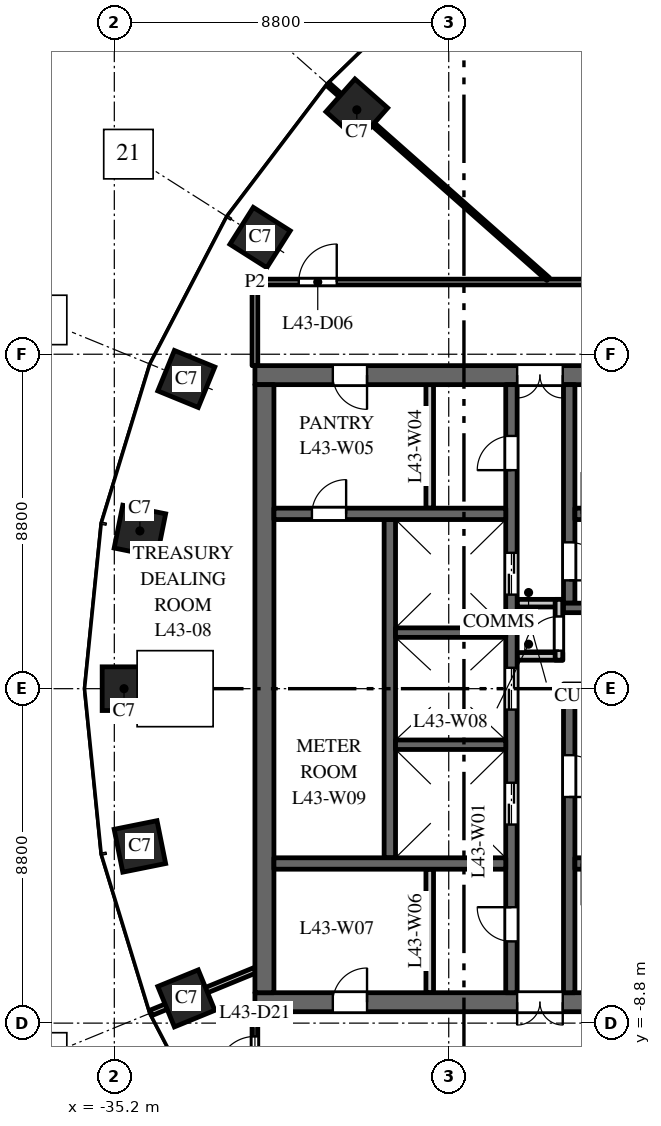
"""IFC4 building model, lengths in metres.
Left out: names, types, materials, properties, quantities, classifications, styles, units other than length and angle.
Written with IfcOpenShell. Run it as: python <this file> out.ifc"""

import sys

from ifc_helpers import new_model, si_unit, direction, frame, frame_2d, origin, origin_2d, place, context, subcontext, project, spatial, rectangle, extrude, element, fill, save


model = new_model("IFC4")
c1 = context("Model", 3, precision=1e-05, world=origin(), true_north=direction((0.0, 1.0)))
c2 = subcontext(c1, "Body", "Model", "MODEL_VIEW")
j1 = project(units=[si_unit("LENGTHUNIT", "METRE"), si_unit("PLANEANGLEUNIT", "RADIAN")], contexts=[c1])
p1 = place(None, origin())
s1 = spatial("IfcSite", under=j1, at=p1, CompositionType="ELEMENT")
p2 = place(p1, origin())
s2 = spatial("IfcBuilding", under=s1, at=p2, CompositionType="ELEMENT")
p3 = place(p2, frame((0.0, 0.0, 186.0)))
s3 = spatial("IfcBuildingStorey", under=s2, at=p3, CompositionType="ELEMENT", Elevation=186.0)
for number, where, z_axis, x_axis in (
    (1, (-28.819, 15.23, 0.0), (0.0, 0.0, 1.0), (-0.663, -0.749, 0.0)),
    (2, (-31.365, 11.871, 0.0), (0.0, 0.0, 1.0), (-0.535, -0.845, 0.0)),
    (3, (-33.305, 8.149, 0.0), (0.0, 0.0, 1.0), (-0.379, -0.925, 0.0)),
    (4, (-34.527, 4.151, 0.0), (0.0, 0.0, 1.0), (-0.197, -0.98, 0.0)),
    (5, (-34.945, 0.0, 0.0), (0.0, 0.0, 1.0), (0.0, -1.0, 0.0)),
    (6, (-34.527, -4.151, 0.0), (0.0, 0.0, 1.0), (0.197, -0.98, 0.0)),
    (7, (-33.305, -8.149, 0.0), (0.0, 0.0, 1.0), (0.379, -0.925, 0.0)),
):
    element("IfcColumn", number, at=place(p3, frame(where, z_axis=z_axis, x_axis=x_axis)), inside=s3, PredefinedType="COLUMN", context=c2, shape_type="SweptSolid", body=[
        extrude(rectangle(XDim=1.15, YDim=1.15, at=origin_2d()), origin(), (0.0, 0.0, 1.0), 4.0),
    ])
p4 = place(p3, frame((-16.5, 8.25, 0.0), z_axis=(0.0, 0.0, 1.0), x_axis=(-1.0, 0.0, 0.0)))
e8 = element("IfcWall", 8, at=p4, inside=s3, PredefinedType="SHEAR", context=c2, shape_type="SweptSolid", body=[
    extrude(rectangle(XDim=15.0, YDim=0.5, at=frame_2d((7.5, 0.0))), origin(), (0.0, 0.0, 1.0), 3.7),
])
p5 = place(p4, frame((6.9, 0.0, 0.0)))
e9 = element("IfcOpeningElement", 9, at=p5, cuts=e8, PredefinedType="OPENING", context=c2, shape_type="SweptSolid", body=[
    extrude(rectangle(XDim=1.2, YDim=2.1, at=frame_2d((0.6, 1.05))), frame((0.0, 0.26, 0.0), z_axis=(0.0, -1.0, 0.0), x_axis=(1.0, 0.0, 0.0)), (0.0, 0.0, 1.0), 0.52),
])
p6 = place(p4, frame((12.05, 0.0, 0.0)))
e10 = element("IfcOpeningElement", 10, at=p6, cuts=e8, PredefinedType="OPENING", context=c2, shape_type="SweptSolid", body=[
    extrude(rectangle(XDim=0.9, YDim=2.1, at=frame_2d((0.45, 1.05))), frame((0.0, 0.26, 0.0), z_axis=(0.0, -1.0, 0.0), x_axis=(1.0, 0.0, 0.0)), (0.0, 0.0, 1.0), 0.52),
])
p7 = place(p3, frame((-16.5, -8.25, 0.0), z_axis=(0.0, 0.0, 1.0), x_axis=(-1.0, 0.0, 0.0)))
e11 = element("IfcWall", 11, at=p7, inside=s3, PredefinedType="SHEAR", context=c2, shape_type="SweptSolid", body=[
    extrude(rectangle(XDim=15.0, YDim=0.5, at=frame_2d((7.5, 0.0))), origin(), (0.0, 0.0, 1.0), 3.7),
])
p8 = place(p7, frame((6.9, 0.0, 0.0)))
e12 = element("IfcOpeningElement", 12, at=p8, cuts=e11, PredefinedType="OPENING", context=c2, shape_type="SweptSolid", body=[
    extrude(rectangle(XDim=1.2, YDim=2.1, at=frame_2d((0.6, 1.05))), frame((0.0, 0.26, 0.0), z_axis=(0.0, -1.0, 0.0), x_axis=(1.0, 0.0, 0.0)), (0.0, 0.0, 1.0), 0.52),
])
p9 = place(p7, frame((12.05, 0.0, 0.0)))
e13 = element("IfcOpeningElement", 13, at=p9, cuts=e11, PredefinedType="OPENING", context=c2, shape_type="SweptSolid", body=[
    extrude(rectangle(XDim=0.9, YDim=2.1, at=frame_2d((0.45, 1.05))), frame((0.0, 0.26, 0.0), z_axis=(0.0, -1.0, 0.0), x_axis=(1.0, 0.0, 0.0)), (0.0, 0.0, 1.0), 0.52),
])
p10 = place(p3, frame((-27.95, -4.45, 0.0), z_axis=(0.0, 0.0, 1.0), x_axis=(0.0, 1.0, 0.0)))
e14 = element("IfcWall", 14, at=p10, inside=s3, PredefinedType="SHEAR", context=c2, shape_type="SweptSolid", body=[
    extrude(rectangle(XDim=8.9, YDim=0.3, at=frame_2d((4.45, 0.0))), origin(), (0.0, 0.0, 1.0), 3.7),
])
p11 = place(p3, frame((-24.75, -8.0, 0.0), z_axis=(0.0, 0.0, 1.0), x_axis=(0.0, 1.0, 0.0)))
e15 = element("IfcWall", 15, at=p11, inside=s3, PredefinedType="SHEAR", context=c2, shape_type="SweptSolid", body=[
    extrude(rectangle(XDim=16.0, YDim=0.3, at=frame_2d((8.0, 0.0))), origin(), (0.0, 0.0, 1.0), 3.7),
])
p12 = place(p11, frame((4.425, 0.0, 0.0)))
e16 = element("IfcOpeningElement", 16, at=p12, cuts=e15, PredefinedType="OPENING", context=c2, shape_type="SweptSolid", body=[
    extrude(rectangle(XDim=1.1, YDim=2.1, at=frame_2d((0.55, 1.05))), frame((0.0, 0.16, 0.0), z_axis=(0.0, -1.0, 0.0), x_axis=(1.0, 0.0, 0.0)), (0.0, 0.0, 1.0), 0.32),
])
p13 = place(p11, frame((7.45, 0.0, 0.0)))
e17 = element("IfcOpeningElement", 17, at=p13, cuts=e15, PredefinedType="OPENING", context=c2, shape_type="SweptSolid", body=[
    extrude(rectangle(XDim=1.1, YDim=2.1, at=frame_2d((0.55, 1.05))), frame((0.0, 0.16, 0.0), z_axis=(0.0, -1.0, 0.0), x_axis=(1.0, 0.0, 0.0)), (0.0, 0.0, 1.0), 0.32),
])
p14 = place(p11, frame((10.475, 0.0, 0.0)))
e18 = element("IfcOpeningElement", 18, at=p14, cuts=e15, PredefinedType="OPENING", context=c2, shape_type="SweptSolid", body=[
    extrude(rectangle(XDim=1.1, YDim=2.1, at=frame_2d((0.55, 1.05))), frame((0.0, 0.16, 0.0), z_axis=(0.0, -1.0, 0.0), x_axis=(1.0, 0.0, 0.0)), (0.0, 0.0, 1.0), 0.32),
])
p15 = place(p11, frame((13.75, 0.0, 0.0)))
e19 = element("IfcOpeningElement", 19, at=p15, cuts=e15, PredefinedType="OPENING", context=c2, shape_type="SweptSolid", body=[
    extrude(rectangle(XDim=0.9, YDim=2.1, at=frame_2d((0.45, 1.05))), frame((0.0, 0.16, 0.0), z_axis=(0.0, -1.0, 0.0), x_axis=(1.0, 0.0, 0.0)), (0.0, 0.0, 1.0), 0.32),
])
p16 = place(p11, frame((1.35, 0.0, 0.0)))
e20 = element("IfcOpeningElement", 20, at=p16, cuts=e15, PredefinedType="OPENING", context=c2, shape_type="SweptSolid", body=[
    extrude(rectangle(XDim=0.9, YDim=2.1, at=frame_2d((0.45, 1.05))), frame((0.0, 0.16, 0.0), z_axis=(0.0, -1.0, 0.0), x_axis=(1.0, 0.0, 0.0)), (0.0, 0.0, 1.0), 0.32),
])
p17 = place(p3, frame((-20.1, 0.0, 0.0), z_axis=(0.0, 0.0, 1.0), x_axis=(-1.0, 0.0, 0.0)))
e21 = element("IfcWall", 21, at=p17, inside=s3, PredefinedType="SHEAR", context=c2, shape_type="SweptSolid", body=[
    extrude(rectangle(XDim=3.28, YDim=0.25, at=frame_2d((1.64, 0.0))), origin(), (0.0, 0.0, 1.0), 3.7),
])
for number, where, z_axis, x_axis in (
    (22, (-23.4, 0.85, 0.0), (0.0, 0.0, 1.0), (-1.0, 0.0, 0.0)),
    (23, (-23.4, 2.25, 0.0), (0.0, 0.0, 1.0), (-1.0, 0.0, 0.0)),
):
    element("IfcWall", number, at=place(p3, frame(where, z_axis=z_axis, x_axis=x_axis)), inside=s3, PredefinedType="PARTITIONING", context=c2, shape_type="SweptSolid", body=[
        extrude(rectangle(XDim=1.2, YDim=0.2, at=frame_2d((0.6, 0.0))), origin(), (0.0, 0.0, 1.0), 3.7),
    ])
p18 = place(p3, frame((-23.5, 0.75, 0.0), z_axis=(0.0, 0.0, 1.0), x_axis=(0.0, 1.0, 0.0)))
e24 = element("IfcWall", 24, at=p18, inside=s3, PredefinedType="PARTITIONING", context=c2, shape_type="SweptSolid", body=[
    extrude(rectangle(XDim=1.6, YDim=0.2, at=frame_2d((0.8, 0.0))), origin(), (0.0, 0.0, 1.0), 3.7),
])
p19 = place(p18, frame((0.25, 0.0, 0.0)))
e25 = element("IfcOpeningElement", 25, at=p19, cuts=e24, PredefinedType="OPENING", context=c2, shape_type="SweptSolid", body=[
    extrude(rectangle(XDim=0.9, YDim=2.1, at=frame_2d((0.45, 1.05))), frame((0.0, 0.11, 0.0), z_axis=(0.0, -1.0, 0.0), x_axis=(1.0, 0.0, 0.0)), (0.0, 0.0, 1.0), 0.22),
])
p20 = place(p3, frame((-31.25, -8.0, 0.0), z_axis=(0.0, 0.0, 1.0), x_axis=(0.0, 1.0, 0.0)))
e26 = element("IfcWall", 26, at=p20, inside=s3, PredefinedType="SHEAR", context=c2, shape_type="SweptSolid", body=[
    extrude(rectangle(XDim=16.0, YDim=0.5, at=frame_2d((8.0, 0.0))), origin(), (0.0, 0.0, 1.0), 3.7),
])
p21 = place(p3, frame((-24.9, 4.6, 0.0), z_axis=(0.0, 0.0, 1.0), x_axis=(-1.0, 0.0, 0.0)))
e27 = element("IfcWall", 27, at=p21, inside=s3, PredefinedType="SHEAR", context=c2, shape_type="SweptSolid", body=[
    extrude(rectangle(XDim=6.1, YDim=0.3, at=frame_2d((3.05, 0.0))), origin(), (0.0, 0.0, 1.0), 3.7),
])
p22 = place(p21, frame((4.2, 0.0, 0.0)))
e28 = element("IfcOpeningElement", 28, at=p22, cuts=e27, PredefinedType="OPENING", context=c2, shape_type="SweptSolid", body=[
    extrude(rectangle(XDim=0.9, YDim=2.1, at=frame_2d((0.45, 1.05))), frame((0.0, 0.16, 0.0), z_axis=(0.0, -1.0, 0.0), x_axis=(1.0, 0.0, 0.0)), (0.0, 0.0, 1.0), 0.32),
])
for number, where, z_axis, x_axis in (
    (29, (-26.9, 4.75, 0.0), (0.0, 0.0, 1.0), (0.0, 1.0, 0.0)),
    (30, (-26.9, -8.0, 0.0), (0.0, 0.0, 1.0), (0.0, 1.0, 0.0)),
):
    element("IfcWall", number, at=place(p3, frame(where, z_axis=z_axis, x_axis=x_axis)), inside=s3, PredefinedType="PARTITIONING", context=c2, shape_type="SweptSolid", body=[
        extrude(rectangle(XDim=3.25, YDim=0.2, at=frame_2d((1.625, 0.0))), origin(), (0.0, 0.0, 1.0), 3.7),
    ])
p23 = place(p3, frame((-24.9, -4.6, 0.0), z_axis=(0.0, 0.0, 1.0), x_axis=(-1.0, 0.0, 0.0)))
e31 = element("IfcWall", 31, at=p23, inside=s3, PredefinedType="SHEAR", context=c2, shape_type="SweptSolid", body=[
    extrude(rectangle(XDim=6.1, YDim=0.3, at=frame_2d((3.05, 0.0))), origin(), (0.0, 0.0, 1.0), 3.7),
])
for number, where, z_axis, x_axis in (
    (32, (-24.9, -1.475, 0.0), (0.0, 0.0, 1.0), (-1.0, 0.0, 0.0)),
    (33, (-24.9, 1.475, 0.0), (0.0, 0.0, 1.0), (-1.0, 0.0, 0.0)),
):
    element("IfcWall", number, at=place(p3, frame(where, z_axis=z_axis, x_axis=x_axis)), inside=s3, PredefinedType="SHEAR", context=c2, shape_type="SweptSolid", body=[
        extrude(rectangle(XDim=2.9, YDim=0.25, at=frame_2d((1.45, 0.0))), origin(), (0.0, 0.0, 1.0), 3.7),
    ])
p24 = place(p3, frame((-23.23, 2.25, 0.0), z_axis=(0.0, 0.0, 1.0), x_axis=(0.0, 1.0, 0.0)))
e34 = element("IfcWall", 34, at=p24, inside=s3, PredefinedType="SHEAR", context=c2, shape_type="SweptSolid", body=[
    extrude(rectangle(XDim=5.75, YDim=0.3, at=frame_2d((2.875, 0.0))), origin(), (0.0, 0.0, 1.0), 3.7),
])
p25 = place(p24, frame((0.6, 0.0, 0.0)))
e35 = element("IfcOpeningElement", 35, at=p25, cuts=e34, PredefinedType="OPENING", context=c2, shape_type="SweptSolid", body=[
    extrude(rectangle(XDim=1.0, YDim=2.1, at=frame_2d((0.5, 1.05))), frame((0.0, 0.16, 0.0), z_axis=(0.0, -1.0, 0.0), x_axis=(1.0, 0.0, 0.0)), (0.0, 0.0, 1.0), 0.32),
])
p26 = place(p3, frame((-23.23, -8.0, 0.0), z_axis=(0.0, 0.0, 1.0), x_axis=(0.0, 1.0, 0.0)))
e36 = element("IfcWall", 36, at=p26, inside=s3, PredefinedType="SHEAR", context=c2, shape_type="SweptSolid", body=[
    extrude(rectangle(XDim=7.875, YDim=0.3, at=frame_2d((3.938, 0.0))), origin(), (0.0, 0.0, 1.0), 3.7),
])
p27 = place(p26, frame((5.15, 0.0, 0.0)))
e37 = element("IfcOpeningElement", 37, at=p27, cuts=e36, PredefinedType="OPENING", context=c2, shape_type="SweptSolid", body=[
    extrude(rectangle(XDim=1.1, YDim=2.1, at=frame_2d((0.55, 1.05))), frame((0.0, 0.16, 0.0), z_axis=(0.0, -1.0, 0.0), x_axis=(1.0, 0.0, 0.0)), (0.0, 0.0, 1.0), 0.32),
])
p28 = place(p3, frame((-16.9, 4.6, 0.0), z_axis=(0.0, 0.0, 1.0), x_axis=(-1.0, 0.0, 0.0)))
e38 = element("IfcWall", 38, at=p28, inside=s3, PredefinedType="SHEAR", context=c2, shape_type="SweptSolid", body=[
    extrude(rectangle(XDim=6.18, YDim=0.3, at=frame_2d((3.09, 0.0))), origin(), (0.0, 0.0, 1.0), 3.7),
])
p29 = place(p28, frame((4.9, 0.0, 0.0)))
e39 = element("IfcOpeningElement", 39, at=p29, cuts=e38, PredefinedType="OPENING", context=c2, shape_type="SweptSolid", body=[
    extrude(rectangle(XDim=1.1, YDim=2.1, at=frame_2d((0.55, 1.05))), frame((0.0, 0.16, 0.0), z_axis=(0.0, -1.0, 0.0), x_axis=(1.0, 0.0, 0.0)), (0.0, 0.0, 1.0), 0.32),
])
p30 = place(p3, frame((-16.9, -4.6, 0.0), z_axis=(0.0, 0.0, 1.0), x_axis=(-1.0, 0.0, 0.0)))
e40 = element("IfcWall", 40, at=p30, inside=s3, PredefinedType="SHEAR", context=c2, shape_type="SweptSolid", body=[
    extrude(rectangle(XDim=6.18, YDim=0.3, at=frame_2d((3.09, 0.0))), origin(), (0.0, 0.0, 1.0), 3.7),
])
p31 = place(p30, frame((4.9, 0.0, 0.0)))
e41 = element("IfcOpeningElement", 41, at=p31, cuts=e40, PredefinedType="OPENING", context=c2, shape_type="SweptSolid", body=[
    extrude(rectangle(XDim=1.1, YDim=2.1, at=frame_2d((0.55, 1.05))), frame((0.0, 0.16, 0.0), z_axis=(0.0, -1.0, 0.0), x_axis=(1.0, 0.0, 0.0)), (0.0, 0.0, 1.0), 0.32),
])
p32 = place(p3, frame((-20.85, 2.125, 0.0), z_axis=(0.0, 0.0, 1.0), x_axis=(-1.0, 0.0, 0.0)))
e42 = element("IfcWall", 42, at=p32, inside=s3, PredefinedType="SHEAR", context=c2, shape_type="SweptSolid", body=[
    extrude(rectangle(XDim=2.53, YDim=0.25, at=frame_2d((1.265, 0.0))), origin(), (0.0, 0.0, 1.0), 3.7),
])
p33 = place(p3, frame((-34.234, -8.53, 0.0), z_axis=(0.0, 0.0, 1.0), x_axis=(0.925344112436, 0.379128307542, 0.0)))
e43 = element("IfcWall", 43, at=p33, inside=s3, PredefinedType="PARTITIONING", context=c2, shape_type="SweptSolid", body=[
    extrude(rectangle(XDim=2.954, YDim=0.15, at=frame_2d((1.477, 0.0))), origin(), (0.0, 0.0, 1.0), 2.9),
])
p34 = place(p3, frame((-31.5, -10.7, 0.0), z_axis=(0.0, 0.0, 1.0), x_axis=(0.0, 1.0, 0.0)))
e44 = element("IfcWall", 44, at=p34, inside=s3, PredefinedType="PARTITIONING", context=c2, shape_type="SweptSolid", body=[
    extrude(rectangle(XDim=2.2, YDim=0.15, at=frame_2d((1.1, 0.0))), origin(), (0.0, 0.0, 1.0), 3.7),
])
p35 = place(p34, frame((0.55, 0.0, 0.0)))
e45 = element("IfcOpeningElement", 45, at=p35, cuts=e44, PredefinedType="OPENING", context=c2, shape_type="SweptSolid", body=[
    extrude(rectangle(XDim=1.0, YDim=2.1, at=frame_2d((0.5, 1.05))), frame((0.0, 0.085, 0.0), z_axis=(0.0, -1.0, 0.0), x_axis=(1.0, 0.0, 0.0)), (0.0, 0.0, 1.0), 0.17),
])
p36 = place(p3, frame((-31.5, 8.5, 0.0), z_axis=(0.0, 0.0, 1.0), x_axis=(0.0, 1.0, 0.0)))
e46 = element("IfcWall", 46, at=p36, inside=s3, PredefinedType="PARTITIONING", context=c2, shape_type="SweptSolid", body=[
    extrude(rectangle(XDim=2.2, YDim=0.15, at=frame_2d((1.1, 0.0))), origin(), (0.0, 0.0, 1.0), 3.7),
])
p37 = place(p3, frame((-31.5, 10.7, 0.0), z_axis=(0.0, 0.0, 1.0), x_axis=(1.0, 0.0, 0.0)))
e47 = element("IfcWall", 47, at=p37, inside=s3, PredefinedType="PARTITIONING", context=c2, shape_type="SweptSolid", body=[
    extrude(rectangle(XDim=15.0, YDim=0.15, at=frame_2d((7.5, 0.0))), origin(), (0.0, 0.0, 1.0), 3.1),
])
p38 = place(p37, frame((1.153, 0.0, 0.0)))
e48 = element("IfcOpeningElement", 48, at=p38, cuts=e47, PredefinedType="OPENING", context=c2, shape_type="SweptSolid", body=[
    extrude(rectangle(XDim=1.0, YDim=2.1, at=frame_2d((0.5, 1.05))), frame((0.0, 0.085, 0.0), z_axis=(0.0, -1.0, 0.0), x_axis=(1.0, 0.0, 0.0)), (0.0, 0.0, 1.0), 0.17),
])
p39 = place(p37, frame((13.35, 0.0, 0.0)))
e49 = element("IfcOpeningElement", 49, at=p39, cuts=e47, PredefinedType="OPENING", context=c2, shape_type="SweptSolid", body=[
    extrude(rectangle(XDim=1.0, YDim=2.1, at=frame_2d((0.5, 1.05))), frame((0.0, 0.085, 0.0), z_axis=(0.0, -1.0, 0.0), x_axis=(1.0, 0.0, 0.0)), (0.0, 0.0, 1.0), 0.17),
])
p40 = place(p3, frame((-29.569, 15.895, 0.0), z_axis=(0.0, 0.0, 1.0), x_axis=(0.748985701008, -0.662586160198, 0.0)))
e50 = element("IfcWall", 50, at=p40, inside=s3, PredefinedType="PARTITIONING", context=c2, shape_type="SweptSolid", body=[
    extrude(rectangle(XDim=7.723, YDim=0.1, at=frame_2d((3.861, 0.0))), origin(), (0.0, 0.0, 1.0), 2.9),
])
p41 = place(p12, origin())
e51 = element("IfcDoor", 51, at=p41, inside=s3, OperationType="DOUBLE_DOOR_SLIDING", PredefinedType="DOOR", context=c2, shape_type="SweptSolid", body=[
    extrude(rectangle(XDim=1.1, YDim=2.1, at=frame_2d((0.55, 1.05))), frame((0.0, 0.025, 0.0), z_axis=(0.0, -1.0, 0.0), x_axis=(1.0, 0.0, 0.0)), (0.0, 0.0, 1.0), 0.05),
])
fill(e16, e51)
p42 = place(p13, origin())
e52 = element("IfcDoor", 52, at=p42, inside=s3, OperationType="DOUBLE_DOOR_SLIDING", PredefinedType="DOOR", context=c2, shape_type="SweptSolid", body=[
    extrude(rectangle(XDim=1.1, YDim=2.1, at=frame_2d((0.55, 1.05))), frame((0.0, 0.025, 0.0), z_axis=(0.0, -1.0, 0.0), x_axis=(1.0, 0.0, 0.0)), (0.0, 0.0, 1.0), 0.05),
])
fill(e17, e52)
p43 = place(p14, origin())
e53 = element("IfcDoor", 53, at=p43, inside=s3, OperationType="DOUBLE_DOOR_SLIDING", PredefinedType="DOOR", context=c2, shape_type="SweptSolid", body=[
    extrude(rectangle(XDim=1.1, YDim=2.1, at=frame_2d((0.55, 1.05))), frame((0.0, 0.025, 0.0), z_axis=(0.0, -1.0, 0.0), x_axis=(1.0, 0.0, 0.0)), (0.0, 0.0, 1.0), 0.05),
])
fill(e18, e53)
p44 = place(p29, origin())
e54 = element("IfcDoor", 54, at=p44, inside=s3, OperationType="SINGLE_SWING_RIGHT", PredefinedType="DOOR", context=c2, shape_type="SweptSolid", body=[
    extrude(rectangle(XDim=1.1, YDim=2.1, at=frame_2d((0.55, 1.05))), frame((0.0, 0.025, 0.0), z_axis=(0.0, -1.0, 0.0), x_axis=(1.0, 0.0, 0.0)), (0.0, 0.0, 1.0), 0.05),
])
fill(e39, e54)
p45 = place(p31, origin())
e55 = element("IfcDoor", 55, at=p45, inside=s3, OperationType="SINGLE_SWING_LEFT", PredefinedType="DOOR", context=c2, shape_type="SweptSolid", body=[
    extrude(rectangle(XDim=1.1, YDim=2.1, at=frame_2d((0.55, 1.05))), frame((0.0, 0.025, 0.0), z_axis=(0.0, -1.0, 0.0), x_axis=(1.0, 0.0, 0.0)), (0.0, 0.0, 1.0), 0.05),
])
fill(e41, e55)
p46 = place(p27, origin())
e56 = element("IfcDoor", 56, at=p46, inside=s3, OperationType="SINGLE_SWING_LEFT", PredefinedType="DOOR", context=c2, shape_type="SweptSolid", body=[
    extrude(rectangle(XDim=1.1, YDim=2.1, at=frame_2d((0.55, 1.05))), frame((0.0, 0.025, 0.0), z_axis=(0.0, -1.0, 0.0), x_axis=(1.0, 0.0, 0.0)), (0.0, 0.0, 1.0), 0.05),
])
fill(e37, e56)
p47 = place(p25, origin())
e57 = element("IfcDoor", 57, at=p47, inside=s3, OperationType="SINGLE_SWING_LEFT", PredefinedType="DOOR", context=c2, shape_type="SweptSolid", body=[
    extrude(rectangle(XDim=1.0, YDim=2.1, at=frame_2d((0.5, 1.05))), frame((0.0, 0.025, 0.0), z_axis=(0.0, -1.0, 0.0), x_axis=(1.0, 0.0, 0.0)), (0.0, 0.0, 1.0), 0.05),
])
fill(e35, e57)
p48 = place(p5, origin())
e58 = element("IfcDoor", 58, at=p48, inside=s3, OperationType="DOUBLE_DOOR_DOUBLE_SWING", PredefinedType="DOOR", context=c2, shape_type="SweptSolid", body=[
    extrude(rectangle(XDim=1.2, YDim=2.1, at=frame_2d((0.6, 1.05))), frame((0.0, 0.025, 0.0), z_axis=(0.0, -1.0, 0.0), x_axis=(1.0, 0.0, 0.0)), (0.0, 0.0, 1.0), 0.05),
])
fill(e9, e58)
p49 = place(p8, origin())
e59 = element("IfcDoor", 59, at=p49, inside=s3, OperationType="DOUBLE_DOOR_DOUBLE_SWING", PredefinedType="DOOR", context=c2, shape_type="SweptSolid", body=[
    extrude(rectangle(XDim=1.2, YDim=2.1, at=frame_2d((0.6, 1.05))), frame((0.0, 0.025, 0.0), z_axis=(0.0, -1.0, 0.0), x_axis=(1.0, 0.0, 0.0)), (0.0, 0.0, 1.0), 0.05),
])
fill(e12, e59)
p50 = place(p15, origin())
e60 = element("IfcDoor", 60, at=p50, inside=s3, OperationType="SINGLE_SWING_RIGHT", PredefinedType="DOOR", context=c2, shape_type="SweptSolid", body=[
    extrude(rectangle(XDim=0.9, YDim=2.1, at=frame_2d((0.45, 1.05))), frame((0.0, 0.025, 0.0), z_axis=(0.0, -1.0, 0.0), x_axis=(1.0, 0.0, 0.0)), (0.0, 0.0, 1.0), 0.05),
])
fill(e19, e60)
p51 = place(p6, origin())
e61 = element("IfcDoor", 61, at=p51, inside=s3, OperationType="SINGLE_SWING_RIGHT", PredefinedType="DOOR", context=c2, shape_type="SweptSolid", body=[
    extrude(rectangle(XDim=0.9, YDim=2.1, at=frame_2d((0.45, 1.05))), frame((0.0, 0.025, 0.0), z_axis=(0.0, -1.0, 0.0), x_axis=(1.0, 0.0, 0.0)), (0.0, 0.0, 1.0), 0.05),
])
fill(e10, e61)
p52 = place(p16, origin())
e62 = element("IfcDoor", 62, at=p52, inside=s3, OperationType="SINGLE_SWING_LEFT", PredefinedType="DOOR", context=c2, shape_type="SweptSolid", body=[
    extrude(rectangle(XDim=0.9, YDim=2.1, at=frame_2d((0.45, 1.05))), frame((0.0, 0.025, 0.0), z_axis=(0.0, -1.0, 0.0), x_axis=(1.0, 0.0, 0.0)), (0.0, 0.0, 1.0), 0.05),
])
fill(e20, e62)
p53 = place(p9, origin())
e63 = element("IfcDoor", 63, at=p53, inside=s3, OperationType="SINGLE_SWING_LEFT", PredefinedType="DOOR", context=c2, shape_type="SweptSolid", body=[
    extrude(rectangle(XDim=0.9, YDim=2.1, at=frame_2d((0.45, 1.05))), frame((0.0, 0.025, 0.0), z_axis=(0.0, -1.0, 0.0), x_axis=(1.0, 0.0, 0.0)), (0.0, 0.0, 1.0), 0.05),
])
fill(e13, e63)
p54 = place(p19, origin())
e64 = element("IfcDoor", 64, at=p54, inside=s3, OperationType="SINGLE_SWING_RIGHT", PredefinedType="DOOR", context=c2, shape_type="SweptSolid", body=[
    extrude(rectangle(XDim=0.9, YDim=2.1, at=frame_2d((0.45, 1.05))), frame((0.0, 0.025, 0.0), z_axis=(0.0, -1.0, 0.0), x_axis=(1.0, 0.0, 0.0)), (0.0, 0.0, 1.0), 0.05),
])
fill(e25, e64)
p55 = place(p22, origin())
e65 = element("IfcDoor", 65, at=p55, inside=s3, OperationType="SINGLE_SWING_LEFT", PredefinedType="DOOR", context=c2, shape_type="SweptSolid", body=[
    extrude(rectangle(XDim=0.9, YDim=2.1, at=frame_2d((0.45, 1.05))), frame((0.0, 0.025, 0.0), z_axis=(0.0, -1.0, 0.0), x_axis=(1.0, 0.0, 0.0)), (0.0, 0.0, 1.0), 0.05),
])
fill(e28, e65)
p56 = place(p38, origin())
e66 = element("IfcDoor", 66, at=p56, inside=s3, OperationType="SINGLE_SWING_RIGHT", PredefinedType="DOOR", context=c2, shape_type="SweptSolid", body=[
    extrude(rectangle(XDim=1.0, YDim=2.1, at=frame_2d((0.5, 1.05))), frame((0.0, 0.025, 0.0), z_axis=(0.0, -1.0, 0.0), x_axis=(1.0, 0.0, 0.0)), (0.0, 0.0, 1.0), 0.05),
])
fill(e48, e66)
p57 = place(p35, origin())
e67 = element("IfcDoor", 67, at=p57, inside=s3, OperationType="SINGLE_SWING_LEFT", PredefinedType="DOOR", context=c2, shape_type="SweptSolid", body=[
    extrude(rectangle(XDim=1.0, YDim=2.1, at=frame_2d((0.5, 1.05))), frame((0.0, 0.025, 0.0), z_axis=(0.0, -1.0, 0.0), x_axis=(1.0, 0.0, 0.0)), (0.0, 0.0, 1.0), 0.05),
])
fill(e45, e67)
save(model, sys.argv[1])
